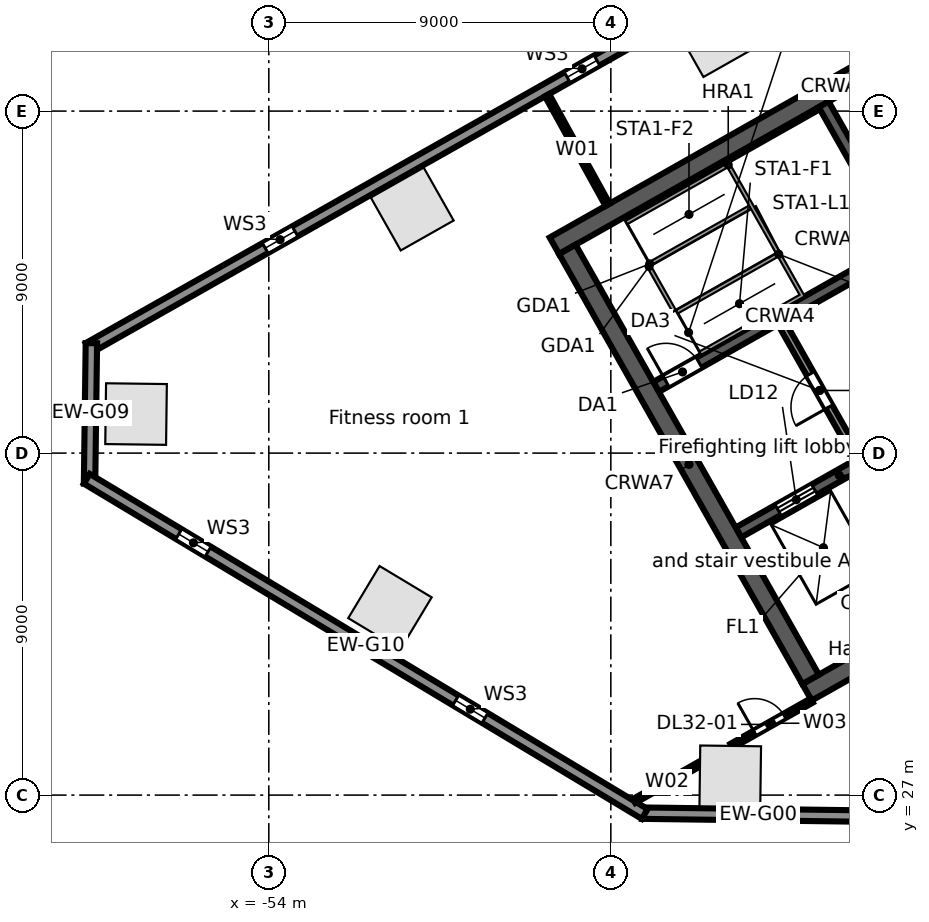
"""IFC4 building model, lengths in metres.
Left out: names, types, materials, properties, quantities, classifications, styles, units other than length and angle.
Written with IfcOpenShell. Run it as: python <this file> out.ifc"""

import sys

from ifc_helpers import new_model, si_unit, direction, frame, frame_2d, origin, origin_2d, place, context, subcontext, project, spatial, rectangle, extrude, element, fill, save


model = new_model("IFC4")
c1 = context("Model", 3, precision=1e-05, world=origin(), true_north=direction((0.0, 1.0)))
c2 = subcontext(c1, "Body", "Model", "MODEL_VIEW")
j1 = project(units=[si_unit("LENGTHUNIT", "METRE"), si_unit("PLANEANGLEUNIT", "RADIAN")], contexts=[c1])
p1 = place(None, origin())
s1 = spatial("IfcSite", under=j1, at=p1, CompositionType="ELEMENT")
p2 = place(p1, origin())
s2 = spatial("IfcBuilding", under=s1, at=p2, CompositionType="ELEMENT")
p3 = place(p2, frame((0.0, 0.0, 154.9)))
s3 = spatial("IfcBuildingStorey", under=s2, at=p3, CompositionType="ELEMENT", Elevation=154.9)
p4 = place(p3, frame((-42.28, 46.919, 0.0), z_axis=(0.0, 0.0, 1.0), x_axis=(-0.87035569594, -0.492423560103, 0.0)))
e1 = element("IfcColumn", 1, at=p4, inside=s3, PredefinedType="COLUMN", context=c2, shape_type="SweptSolid", body=[
    extrude(rectangle(XDim=1.5, YDim=1.5, at=origin_2d()), origin(), (0.0, 0.0, 1.0), 4.0),
])
for number, where, z_axis, x_axis in (
    (2, (-50.226, 42.423, 0.0), (0.0, 0.0, 1.0), (-0.87, -0.492, 0.0)),
    (3, (-57.493, 37.027, 0.0), (0.0, 0.0, 1.0), (-0.013, -1.0, 0.0)),
    (4, (-50.812, 31.931, 0.0), (0.0, 0.0, 1.0), (0.857, -0.515, 0.0)),
    (5, (-41.858, 27.495, 0.0), (0.0, 0.0, 1.0), (1.0, -0.013, 0.0)),
):
    element("IfcColumn", number, at=place(p3, frame(where, z_axis=z_axis, x_axis=x_axis)), inside=s3, PredefinedType="COLUMN", context=c2, shape_type="SweptSolid", body=[
        extrude(rectangle(XDim=1.6, YDim=1.6, at=origin_2d()), origin(), (0.0, 0.0, 1.0), 4.0),
    ])
p5 = place(p3, frame((-38.057, 26.445, 0.0), z_axis=(0.0, 0.0, 1.0), x_axis=(-0.999914086342, 0.013108010296, 0.0)))
e6 = element("IfcWall", 6, at=p5, inside=s3, PredefinedType="STANDARD", context=c2, shape_type="SweptSolid", body=[
    extrude(rectangle(XDim=6.128, YDim=0.3, at=frame_2d((3.064, 0.0))), origin(), (0.0, 0.0, 1.0), 3.68),
])
p6 = place(p3, frame((-58.745, 38.764, 0.0), z_axis=(0.0, 0.0, 1.0), x_axis=(0.870355811726, 0.492423355453, 0.0)))
e7 = element("IfcWall", 7, at=p6, inside=s3, PredefinedType="STANDARD", context=c2, shape_type="SweptSolid", body=[
    extrude(rectangle(XDim=64.025, YDim=0.3, at=frame_2d((32.013, 0.0))), origin(), (0.0, 0.0, 1.0), 3.68),
])
p7 = place(p6, frame((60.122, 0.0, 0.6)))
e8 = element("IfcOpeningElement", 8, at=p7, cuts=e7, PredefinedType="OPENING", context=c2, shape_type="SweptSolid", body=[
    extrude(rectangle(XDim=0.9, YDim=2.4, at=frame_2d((0.45, 1.2))), frame((0.0, 0.16, 0.0), z_axis=(0.0, -1.0, 0.0), x_axis=(1.0, 0.0, 0.0)), (0.0, 0.0, 1.0), 0.32),
])
p8 = place(p6, frame((50.992, 0.0, 0.6)))
e9 = element("IfcOpeningElement", 9, at=p8, cuts=e7, PredefinedType="OPENING", context=c2, shape_type="SweptSolid", body=[
    extrude(rectangle(XDim=0.9, YDim=2.4, at=frame_2d((0.45, 1.2))), frame((0.0, 0.16, 0.0), z_axis=(0.0, -1.0, 0.0), x_axis=(1.0, 0.0, 0.0)), (0.0, 0.0, 1.0), 0.32),
])
p9 = place(p6, frame((41.862, 0.0, 0.6)))
e10 = element("IfcOpeningElement", 10, at=p9, cuts=e7, PredefinedType="OPENING", context=c2, shape_type="SweptSolid", body=[
    extrude(rectangle(XDim=0.9, YDim=2.4, at=frame_2d((0.45, 1.2))), frame((0.0, 0.16, 0.0), z_axis=(0.0, -1.0, 0.0), x_axis=(1.0, 0.0, 0.0)), (0.0, 0.0, 1.0), 0.32),
])
p10 = place(p6, frame((32.732, 0.0, 0.6)))
e11 = element("IfcOpeningElement", 11, at=p10, cuts=e7, PredefinedType="OPENING", context=c2, shape_type="SweptSolid", body=[
    extrude(rectangle(XDim=0.9, YDim=2.4, at=frame_2d((0.45, 1.2))), frame((0.0, 0.16, 0.0), z_axis=(0.0, -1.0, 0.0), x_axis=(1.0, 0.0, 0.0)), (0.0, 0.0, 1.0), 0.32),
])
p11 = place(p6, frame((23.602, 0.0, 0.6)))
e12 = element("IfcOpeningElement", 12, at=p11, cuts=e7, PredefinedType="OPENING", context=c2, shape_type="SweptSolid", body=[
    extrude(rectangle(XDim=0.9, YDim=2.4, at=frame_2d((0.45, 1.2))), frame((0.0, 0.16, 0.0), z_axis=(0.0, -1.0, 0.0), x_axis=(1.0, 0.0, 0.0)), (0.0, 0.0, 1.0), 0.32),
])
p12 = place(p6, frame((14.472, 0.0, 0.6)))
e13 = element("IfcOpeningElement", 13, at=p12, cuts=e7, PredefinedType="OPENING", context=c2, shape_type="SweptSolid", body=[
    extrude(rectangle(XDim=0.9, YDim=2.4, at=frame_2d((0.45, 1.2))), frame((0.0, 0.16, 0.0), z_axis=(0.0, -1.0, 0.0), x_axis=(1.0, 0.0, 0.0)), (0.0, 0.0, 1.0), 0.32),
])
p13 = place(p6, frame((5.342, 0.0, 0.6)))
e14 = element("IfcOpeningElement", 14, at=p13, cuts=e7, PredefinedType="OPENING", context=c2, shape_type="SweptSolid", body=[
    extrude(rectangle(XDim=0.9, YDim=2.4, at=frame_2d((0.45, 1.2))), frame((0.0, 0.16, 0.0), z_axis=(0.0, -1.0, 0.0), x_axis=(1.0, 0.0, 0.0)), (0.0, 0.0, 1.0), 0.32),
])
p14 = place(p3, frame((-58.717, 35.194, 0.0), z_axis=(0.0, 0.0, 1.0), x_axis=(0.013069053407, 0.999914596275, 0.0)))
e15 = element("IfcWall", 15, at=p14, inside=s3, PredefinedType="STANDARD", context=c2, shape_type="SweptSolid", body=[
    extrude(rectangle(XDim=3.699, YDim=0.3, at=frame_2d((1.849, 0.0))), origin(), (0.0, 0.0, 1.0), 3.68),
])
p15 = place(p3, frame((-44.109, 26.504, 0.0), z_axis=(0.0, 0.0, 1.0), x_axis=(-0.857169502585, 0.515034410344, 0.0)))
e16 = element("IfcWall", 16, at=p15, inside=s3, PredefinedType="STANDARD", context=c2, shape_type="SweptSolid", body=[
    extrude(rectangle(XDim=17.127, YDim=0.3, at=frame_2d((8.563, 0.0))), origin(), (0.0, 0.0, 1.0), 3.68),
])
p16 = place(p15, frame((13.403, 0.0, 0.6)))
e17 = element("IfcOpeningElement", 17, at=p16, cuts=e16, PredefinedType="OPENING", context=c2, shape_type="SweptSolid", body=[
    extrude(rectangle(XDim=0.9, YDim=2.4, at=frame_2d((0.45, 1.2))), frame((0.0, 0.16, 0.0), z_axis=(0.0, -1.0, 0.0), x_axis=(1.0, 0.0, 0.0)), (0.0, 0.0, 1.0), 0.32),
])
p17 = place(p15, frame((4.903, 0.0, 0.6)))
e18 = element("IfcOpeningElement", 18, at=p17, cuts=e16, PredefinedType="OPENING", context=c2, shape_type="SweptSolid", body=[
    extrude(rectangle(XDim=0.9, YDim=2.4, at=frame_2d((0.45, 1.2))), frame((0.0, 0.16, 0.0), z_axis=(0.0, -1.0, 0.0), x_axis=(1.0, 0.0, 0.0)), (0.0, 0.0, 1.0), 0.32),
])
p18 = place(p3, frame((-39.838, 29.705, 0.0), z_axis=(0.0, 0.0, 1.0), x_axis=(0.870350116061, 0.492433422375, 0.0)))
e19 = element("IfcWall", 19, at=p18, inside=s3, PredefinedType="SOLIDWALL", context=c2, shape_type="SweptSolid", body=[
    extrude(rectangle(XDim=17.0, YDim=0.5, at=frame_2d((8.5, 0.0))), origin(), (0.0, 0.0, 1.0), 3.68),
])
p19 = place(p18, frame((7.2, 0.0, 0.0)))
e20 = element("IfcOpeningElement", 20, at=p19, cuts=e19, PredefinedType="OPENING", context=c2, shape_type="SweptSolid", body=[
    extrude(rectangle(XDim=1.2, YDim=2.1, at=frame_2d((0.6, 1.05))), frame((0.0, 0.26, 0.0), z_axis=(0.0, -1.0, 0.0), x_axis=(1.0, 0.0, 0.0)), (0.0, 0.0, 1.0), 0.52),
])
p20 = place(p3, frame((-41.643, 33.912, 0.0), z_axis=(0.0, 0.0, 1.0), x_axis=(0.870343599782, 0.492444939378, 0.0)))
e21 = element("IfcWall", 21, at=p20, inside=s3, PredefinedType="SOLIDWALL", context=c2, shape_type="SweptSolid", body=[
    extrude(rectangle(XDim=6.1, YDim=0.3, at=frame_2d((3.05, 0.0))), origin(), (0.0, 0.0, 1.0), 3.68),
])
p21 = place(p20, frame((1.2, 0.0, 0.0)))
e22 = element("IfcOpeningElement", 22, at=p21, cuts=e21, PredefinedType="OPENING", context=c2, shape_type="SweptSolid", body=[
    extrude(rectangle(XDim=1.1, YDim=2.1, at=frame_2d((0.55, 1.05))), frame((0.0, 0.16, 0.0), z_axis=(0.0, -1.0, 0.0), x_axis=(1.0, 0.0, 0.0)), (0.0, 0.0, 1.0), 0.32),
])
p22 = place(p20, frame((4.35, 0.0, 0.0)))
e23 = element("IfcOpeningElement", 23, at=p22, cuts=e21, PredefinedType="OPENING", context=c2, shape_type="SweptSolid", body=[
    extrude(rectangle(XDim=1.1, YDim=2.1, at=frame_2d((0.55, 1.05))), frame((0.0, 0.16, 0.0), z_axis=(0.0, -1.0, 0.0), x_axis=(1.0, 0.0, 0.0)), (0.0, 0.0, 1.0), 0.32),
])
p23 = place(p3, frame((-43.81, 37.741, 0.0), z_axis=(0.0, 0.0, 1.0), x_axis=(0.870350569555, 0.492432620848, 0.0)))
e24 = element("IfcWall", 24, at=p23, inside=s3, PredefinedType="SOLIDWALL", context=c2, shape_type="SweptSolid", body=[
    extrude(rectangle(XDim=7.5, YDim=0.3, at=frame_2d((3.75, 0.0))), origin(), (0.0, 0.0, 1.0), 3.68),
])
p24 = place(p23, frame((0.3, 0.0, 0.0)))
e25 = element("IfcOpeningElement", 25, at=p24, cuts=e24, PredefinedType="OPENING", context=c2, shape_type="SweptSolid", body=[
    extrude(rectangle(XDim=1.0, YDim=2.1, at=frame_2d((0.5, 1.05))), frame((0.0, 0.16, 0.0), z_axis=(0.0, -1.0, 0.0), x_axis=(1.0, 0.0, 0.0)), (0.0, 0.0, 1.0), 0.32),
])
p25 = place(p3, frame((-46.486, 41.455, 0.0), z_axis=(0.0, 0.0, 1.0), x_axis=(0.870353598469, 0.492427267353, 0.0)))
e26 = element("IfcWall", 26, at=p25, inside=s3, PredefinedType="SOLIDWALL", context=c2, shape_type="SweptSolid", body=[
    extrude(rectangle(XDim=17.0, YDim=0.5, at=frame_2d((8.5, 0.0))), origin(), (0.0, 0.0, 1.0), 3.68),
])
p26 = place(p3, frame((-46.145, 41.361, 0.0), z_axis=(0.0, 0.0, 1.0), x_axis=(0.492435316254, -0.870349044525, 0.0)))
e27 = element("IfcWall", 27, at=p26, inside=s3, PredefinedType="SOLIDWALL", context=c2, shape_type="SweptSolid", body=[
    extrude(rectangle(XDim=13.0, YDim=0.5, at=frame_2d((6.5, 0.0))), origin(), (0.0, 0.0, 1.0), 3.68),
])
p27 = place(p3, frame((-40.516, 39.433, 0.0), z_axis=(0.0, 0.0, 1.0), x_axis=(0.492453559952, -0.87033872216, 0.0)))
e28 = element("IfcWall", 28, at=p27, inside=s3, PredefinedType="PARTITIONING", context=c2, shape_type="SweptSolid", body=[
    extrude(rectangle(XDim=4.1, YDim=0.2, at=frame_2d((2.05, 0.0))), origin(), (0.0, 0.0, 1.0), 3.68),
])
p28 = place(p27, frame((1.55, 0.0, 0.0)))
e29 = element("IfcOpeningElement", 29, at=p28, cuts=e28, PredefinedType="OPENING", context=c2, shape_type="SweptSolid", body=[
    extrude(rectangle(XDim=1.0, YDim=2.1, at=frame_2d((0.5, 1.05))), frame((0.0, 0.11, 0.0), z_axis=(0.0, -1.0, 0.0), x_axis=(1.0, 0.0, 0.0)), (0.0, 0.0, 1.0), 0.22),
])
p29 = place(p3, frame((-39.399, 45.177, 0.0), z_axis=(0.0, 0.0, 1.0), x_axis=(0.492396453737, -0.870371031427, 0.0)))
e30 = element("IfcWall", 30, at=p29, inside=s3, PredefinedType="SOLIDWALL", context=c2, shape_type="SweptSolid", body=[
    extrude(rectangle(XDim=4.15, YDim=0.3, at=frame_2d((2.075, 0.0))), origin(), (0.0, 0.0, 1.0), 3.68),
])
p30 = place(p3, frame((-46.678, 45.419, 0.0), z_axis=(0.0, 0.0, 1.0), x_axis=(0.483275206546, -0.875468488718, 0.0)))
e31 = element("IfcWall", 31, at=p30, inside=s3, PredefinedType="PARTITIONING", context=c2, shape_type="SweptSolid", body=[
    extrude(rectangle(XDim=3.294, YDim=0.125, at=frame_2d((1.647, 0.0))), origin(), (0.0, 0.0, 1.0), 2.96),
])
p31 = place(p3, frame((-44.386, 26.845, 0.0), z_axis=(0.0, 0.0, 1.0), x_axis=(0.870453184796, 0.492251209322, 0.0)))
e32 = element("IfcWall", 32, at=p31, inside=s3, PredefinedType="PARTITIONING", context=c2, shape_type="SweptSolid", body=[
    extrude(rectangle(XDim=1.991, YDim=0.125, at=frame_2d((0.995, 0.0))), origin(), (0.0, 0.0, 1.0), 3.68),
])
p32 = place(p3, frame((-41.824, 28.294, 0.0), z_axis=(0.0, 0.0, 1.0), x_axis=(0.870189216305, 0.492717695873, 0.0)))
e33 = element("IfcWall", 33, at=p32, inside=s3, PredefinedType="PARTITIONING", context=c2, shape_type="SweptSolid", body=[
    extrude(rectangle(XDim=2.424, YDim=0.125, at=frame_2d((1.212, 0.0))), origin(), (0.0, 0.0, 1.0), 3.68),
])
p33 = place(p32, frame((0.7, 0.0, 0.0)))
e34 = element("IfcOpeningElement", 34, at=p33, cuts=e33, PredefinedType="OPENING", context=c2, shape_type="SweptSolid", body=[
    extrude(rectangle(XDim=0.9, YDim=2.1, at=frame_2d((0.45, 1.05))), frame((0.0, 0.073, 0.0), z_axis=(0.0, -1.0, 0.0), x_axis=(1.0, 0.0, 0.0)), (0.0, 0.0, 1.0), 0.145),
])
p34 = place(p12, origin())
e35 = element("IfcWindow", 35, at=p34, inside=s3, PartitioningType="SINGLE_PANEL", PredefinedType="WINDOW", context=c2, shape_type="SweptSolid", body=[
    extrude(rectangle(XDim=0.9, YDim=2.4, at=frame_2d((0.45, 1.2))), frame((0.0, 0.03, 0.0), z_axis=(0.0, -1.0, 0.0), x_axis=(1.0, 0.0, 0.0)), (0.0, 0.0, 1.0), 0.06),
])
fill(e13, e35)
p35 = place(p13, origin())
e36 = element("IfcWindow", 36, at=p35, inside=s3, PartitioningType="SINGLE_PANEL", PredefinedType="WINDOW", context=c2, shape_type="SweptSolid", body=[
    extrude(rectangle(XDim=0.9, YDim=2.4, at=frame_2d((0.45, 1.2))), frame((0.0, 0.03, 0.0), z_axis=(0.0, -1.0, 0.0), x_axis=(1.0, 0.0, 0.0)), (0.0, 0.0, 1.0), 0.06),
])
fill(e14, e36)
p36 = place(p16, origin())
e37 = element("IfcWindow", 37, at=p36, inside=s3, PartitioningType="SINGLE_PANEL", PredefinedType="WINDOW", context=c2, shape_type="SweptSolid", body=[
    extrude(rectangle(XDim=0.9, YDim=2.4, at=frame_2d((0.45, 1.2))), frame((0.0, 0.03, 0.0), z_axis=(0.0, -1.0, 0.0), x_axis=(1.0, 0.0, 0.0)), (0.0, 0.0, 1.0), 0.06),
])
fill(e17, e37)
p37 = place(p17, origin())
e38 = element("IfcWindow", 38, at=p37, inside=s3, PartitioningType="SINGLE_PANEL", PredefinedType="WINDOW", context=c2, shape_type="SweptSolid", body=[
    extrude(rectangle(XDim=0.9, YDim=2.4, at=frame_2d((0.45, 1.2))), frame((0.0, 0.03, 0.0), z_axis=(0.0, -1.0, 0.0), x_axis=(1.0, 0.0, 0.0)), (0.0, 0.0, 1.0), 0.06),
])
fill(e18, e38)
p38 = place(p21, origin())
e39 = element("IfcDoor", 39, at=p38, inside=s3, OperationType="DOUBLE_DOOR_SLIDING", PredefinedType="DOOR", context=c2, shape_type="SweptSolid", body=[
    extrude(rectangle(XDim=1.1, YDim=2.1, at=frame_2d((0.55, 1.05))), frame((0.0, 0.025, 0.0), z_axis=(0.0, -1.0, 0.0), x_axis=(1.0, 0.0, 0.0)), (0.0, 0.0, 1.0), 0.05),
])
fill(e22, e39)
p39 = place(p24, origin())
e40 = element("IfcDoor", 40, at=p39, inside=s3, OperationType="SINGLE_SWING_LEFT", PredefinedType="DOOR", context=c2, shape_type="SweptSolid", body=[
    extrude(rectangle(XDim=1.0, YDim=2.1, at=frame_2d((0.5, 1.05))), frame((0.0, 0.025, 0.0), z_axis=(0.0, -1.0, 0.0), x_axis=(1.0, 0.0, 0.0)), (0.0, 0.0, 1.0), 0.05),
])
fill(e25, e40)
p40 = place(p28, frame((1.0, 0.0, 0.0), z_axis=(0.0, 0.0, 1.0), x_axis=(-1.0, 0.0, 0.0)))
e41 = element("IfcDoor", 41, at=p40, inside=s3, OperationType="SINGLE_SWING_LEFT", PredefinedType="DOOR", context=c2, shape_type="SweptSolid", body=[
    extrude(rectangle(XDim=1.0, YDim=2.1, at=frame_2d((0.5, 1.05))), frame((0.0, 0.025, 0.0), z_axis=(0.0, -1.0, 0.0), x_axis=(1.0, 0.0, 0.0)), (0.0, 0.0, 1.0), 0.05),
])
fill(e29, e41)
p41 = place(p33, origin())
e42 = element("IfcDoor", 42, at=p41, inside=s3, OperationType="SINGLE_SWING_LEFT", PredefinedType="DOOR", context=c2, shape_type="SweptSolid", body=[
    extrude(rectangle(XDim=0.9, YDim=2.1, at=frame_2d((0.45, 1.05))), frame((0.0, 0.025, 0.0), z_axis=(0.0, -1.0, 0.0), x_axis=(1.0, 0.0, 0.0)), (0.0, 0.0, 1.0), 0.05),
])
fill(e34, e42)
save(model, sys.argv[1])
